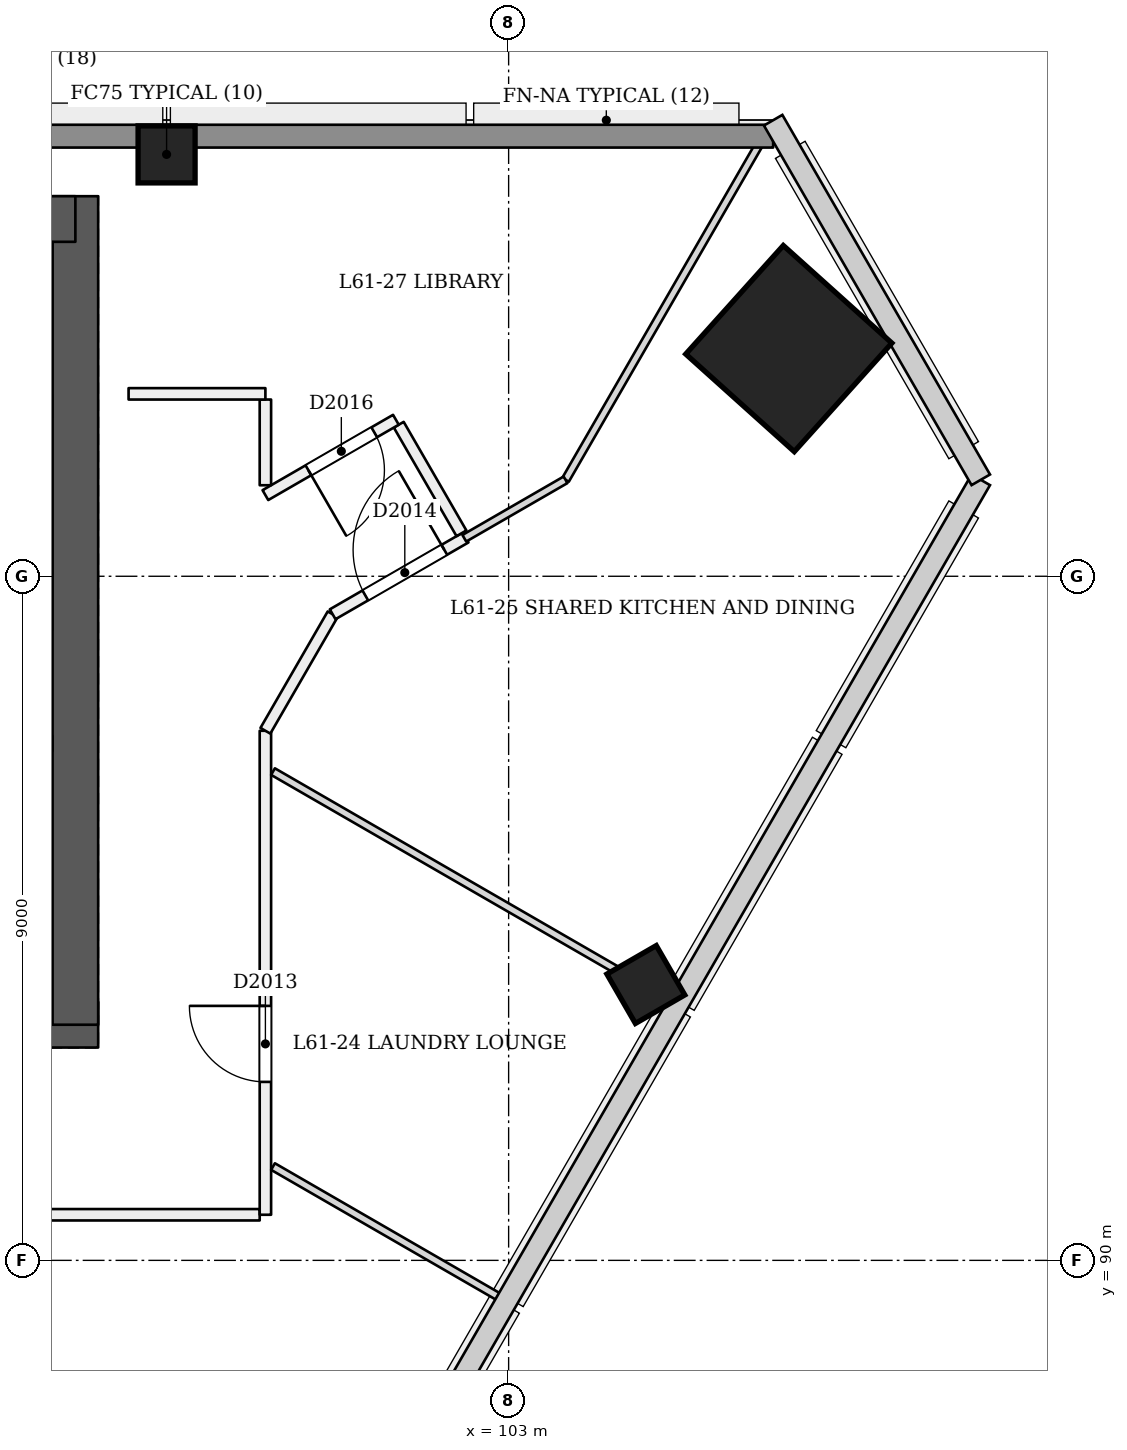
"""IFC4 building model, lengths in metres.
Left out: names, types, materials, properties, quantities, classifications, styles, units other than length and angle.
Written with IfcOpenShell. Run it as: python <this file> out.ifc"""

import sys

from ifc_helpers import new_model, si_unit, direction, frame, frame_2d, origin, origin_2d, place, context, subcontext, project, spatial, rectangle, extrude, element, fill, save


model = new_model("IFC4")
c1 = context("Model", 3, precision=1e-05, world=origin(), true_north=direction((0.0, 1.0)))
c2 = subcontext(c1, "Body", "Model", "MODEL_VIEW")
j1 = project(units=[si_unit("LENGTHUNIT", "METRE"), si_unit("PLANEANGLEUNIT", "RADIAN")], contexts=[c1])
p1 = place(None, origin())
s1 = spatial("IfcSite", under=j1, at=p1, CompositionType="ELEMENT")
p2 = place(p1, origin())
s2 = spatial("IfcBuilding", under=s1, at=p2, CompositionType="ELEMENT")
p3 = place(p2, frame((0.0, 0.0, 239.2)))
s3 = spatial("IfcBuildingStorey", under=s2, at=p3, CompositionType="ELEMENT", Elevation=239.2)
p4 = place(p3, frame((72.7, 93.1, 0.0), z_axis=(0.0, 0.0, 1.0), x_axis=(1.0, 0.0, 0.0)))
e1 = element("IfcWall", 1, at=p4, inside=s3, PredefinedType="SHEAR", context=c2, shape_type="SweptSolid", body=[
    extrude(rectangle(XDim=24.9, YDim=0.6, at=frame_2d((12.45, 0.0))), origin(), (0.0, 0.0, 1.0), 3.6),
])
p5 = place(p4, frame((1.1, 0.0, 0.0)))
e2 = element("IfcOpeningElement", 2, at=p5, cuts=e1, PredefinedType="OPENING", context=c2, shape_type="SweptSolid", body=[
    extrude(rectangle(XDim=1.2, YDim=2.1, at=frame_2d((0.6, 1.05))), frame((0.0, 0.311, 0.0), z_axis=(0.0, -1.0, 0.0), x_axis=(1.0, 0.0, 0.0)), (0.0, 0.0, 1.0), 0.621),
])
p6 = place(p4, frame((3.3, 0.0, 0.0)))
e3 = element("IfcOpeningElement", 3, at=p6, cuts=e1, PredefinedType="OPENING", context=c2, shape_type="SweptSolid", body=[
    extrude(rectangle(XDim=1.2, YDim=2.1, at=frame_2d((0.6, 1.05))), frame((0.0, 0.311, 0.0), z_axis=(0.0, -1.0, 0.0), x_axis=(1.0, 0.0, 0.0)), (0.0, 0.0, 1.0), 0.621),
])
p7 = place(p4, frame((13.3, 0.0, 0.0)))
e4 = element("IfcOpeningElement", 4, at=p7, cuts=e1, PredefinedType="OPENING", context=c2, shape_type="SweptSolid", body=[
    extrude(rectangle(XDim=1.2, YDim=2.1, at=frame_2d((0.6, 1.05))), frame((0.0, 0.311, 0.0), z_axis=(0.0, -1.0, 0.0), x_axis=(1.0, 0.0, 0.0)), (0.0, 0.0, 1.0), 0.621),
])
p8 = place(p4, frame((15.562, 0.0, 0.0)))
e5 = element("IfcOpeningElement", 5, at=p8, cuts=e1, PredefinedType="OPENING", context=c2, shape_type="SweptSolid", body=[
    extrude(rectangle(XDim=1.0, YDim=2.1, at=frame_2d((0.5, 1.05))), frame((0.0, 0.311, 0.0), z_axis=(0.0, -1.0, 0.0), x_axis=(1.0, 0.0, 0.0)), (0.0, 0.0, 1.0), 0.621),
])
p9 = place(p4, frame((18.2, 0.0, 0.0)))
e6 = element("IfcOpeningElement", 6, at=p9, cuts=e1, PredefinedType="OPENING", context=c2, shape_type="SweptSolid", body=[
    extrude(rectangle(XDim=1.0, YDim=2.1, at=frame_2d((0.5, 1.05))), frame((0.0, 0.311, 0.0), z_axis=(0.0, -1.0, 0.0), x_axis=(1.0, 0.0, 0.0)), (0.0, 0.0, 1.0), 0.621),
])
p10 = place(p4, frame((21.788, 0.0, 0.0)))
e7 = element("IfcOpeningElement", 7, at=p10, cuts=e1, PredefinedType="OPENING", context=c2, shape_type="SweptSolid", body=[
    extrude(rectangle(XDim=1.0, YDim=2.1, at=frame_2d((0.5, 1.05))), frame((0.0, 0.311, 0.0), z_axis=(0.0, -1.0, 0.0), x_axis=(1.0, 0.0, 0.0)), (0.0, 0.0, 1.0), 0.621),
])
p11 = place(p3, frame((97.3, 93.1, 0.0), z_axis=(0.0, 0.0, 1.0), x_axis=(0.0, 1.0, 0.0)))
e8 = element("IfcWall", 8, at=p11, inside=s3, PredefinedType="SHEAR", context=c2, shape_type="SweptSolid", body=[
    extrude(rectangle(XDim=10.9, YDim=0.6, at=frame_2d((5.45, 0.0))), origin(), (0.0, 0.0, 1.0), 3.6),
])
p12 = place(p3, frame((97.3, 103.7, 0.0), z_axis=(0.0, 0.0, 1.0), x_axis=(-1.0, 0.0, 0.0)))
e9 = element("IfcWall", 9, at=p12, inside=s3, PredefinedType="SHEAR", context=c2, shape_type="SweptSolid", body=[
    extrude(rectangle(XDim=24.9, YDim=0.6, at=frame_2d((12.45, 0.0))), origin(), (0.0, 0.0, 1.0), 3.6),
])
p13 = place(p3, frame((106.72, 101.984, 0.0), z_axis=(-0.028334066552, 0.009286524205, 0.999555371723), x_axis=(0.498285552857, -0.866729299586, 0.022177219255)))
e10 = element("IfcColumn", 10, at=p13, inside=s3, PredefinedType="COLUMN", context=c2, shape_type="SweptSolid", body=[
    extrude(rectangle(XDim=1.92, YDim=1.92, at=origin_2d()), origin(), (0.0, 0.0, 1.0), 3.602),
])
p14 = place(p3, frame((98.5, 104.55, 0.0), z_axis=(0.0, 0.0, 1.0), x_axis=(1.0, 0.0, 0.0)))
e11 = element("IfcColumn", 11, at=p14, inside=s3, PredefinedType="COLUMN", context=c2, shape_type="SweptSolid", body=[
    extrude(rectangle(XDim=0.75, YDim=0.75, at=origin_2d()), origin(), (0.0, 0.0, 1.0), 3.6),
])
p15 = place(p3, frame((104.832, 93.582, -0.023), z_axis=(-0.02215369191, 0.038413282303, 0.999016333038), x_axis=(-0.500654723088, -0.865363077154, 0.022171895449)))
e12 = element("IfcColumn", 12, at=p15, inside=s3, PredefinedType="COLUMN", context=c2, shape_type="SweptSolid", body=[
    extrude(rectangle(XDim=0.75, YDim=0.75, at=origin_2d()), origin(), (0.0, 0.0, 1.0), 3.604),
])
p16 = place(p3, frame((96.124, 90.6, 0.0), z_axis=(0.0, 0.0, 1.0), x_axis=(1.0, 0.0, 0.0)))
e13 = element("IfcWall", 13, at=p16, inside=s3, PredefinedType="PARTITIONING", context=c2, shape_type="SweptSolid", body=[
    extrude(rectangle(XDim=3.601, YDim=0.15, at=frame_2d((1.801, 0.0))), origin(), (0.0, 0.0, 1.0), 3.2),
])
p17 = place(p3, frame((99.8, 90.6, 0.0), z_axis=(0.0, 0.0, 1.0), x_axis=(0.0, 1.0, 0.0)))
e14 = element("IfcWall", 14, at=p17, inside=s3, PredefinedType="PARTITIONING", context=c2, shape_type="SweptSolid", body=[
    extrude(rectangle(XDim=6.367, YDim=0.15, at=frame_2d((3.184, 0.0))), origin(), (0.0, 0.0, 1.0), 3.2),
])
p18 = place(p17, frame((1.748, 0.0, 0.0)))
e15 = element("IfcOpeningElement", 15, at=p18, cuts=e14, PredefinedType="OPENING", context=c2, shape_type="SweptSolid", body=[
    extrude(rectangle(XDim=1.0, YDim=2.1, at=frame_2d((0.5, 1.05))), frame((0.0, 0.085, 0.0), z_axis=(0.0, -1.0, 0.0), x_axis=(1.0, 0.0, 0.0)), (0.0, 0.0, 1.0), 0.171),
])
p19 = place(p3, frame((99.8, 96.967, 0.0), z_axis=(0.0, 0.0, 1.0), x_axis=(0.499937404092, 0.866061540533, 0.0)))
e16 = element("IfcWall", 16, at=p19, inside=s3, PredefinedType="PARTITIONING", context=c2, shape_type="SweptSolid", body=[
    extrude(rectangle(XDim=1.77, YDim=0.15, at=frame_2d((0.885, 0.0))), origin(), (0.0, 0.0, 1.0), 3.2),
])
p20 = place(p3, frame((100.685, 98.5, 0.0), z_axis=(0.0, 0.0, 1.0), x_axis=(0.866040685659, 0.499973530083, 0.0)))
e17 = element("IfcWall", 17, at=p20, inside=s3, PredefinedType="PARTITIONING", context=c2, shape_type="SweptSolid", body=[
    extrude(rectangle(XDim=2.02, YDim=0.15, at=frame_2d((1.01, 0.0))), origin(), (0.0, 0.0, 1.0), 3.2),
])
p21 = place(p20, frame((0.496, 0.0, 0.0)))
e18 = element("IfcOpeningElement", 18, at=p21, cuts=e17, PredefinedType="OPENING", context=c2, shape_type="SweptSolid", body=[
    extrude(rectangle(XDim=1.2, YDim=2.1, at=frame_2d((0.6, 1.05))), frame((0.0, 0.085, 0.0), z_axis=(0.0, -1.0, 0.0), x_axis=(1.0, 0.0, 0.0)), (0.0, 0.0, 1.0), 0.171),
])
p22 = place(p3, frame((102.379, 99.565, 0.0), z_axis=(0.0, 0.0, 1.0), x_axis=(-0.499974350878, 0.866040211805, 0.0)))
e19 = element("IfcWall", 19, at=p22, inside=s3, PredefinedType="PARTITIONING", context=c2, shape_type="SweptSolid", body=[
    extrude(rectangle(XDim=1.65, YDim=0.15, at=frame_2d((0.825, 0.0))), origin(), (0.0, 0.0, 1.0), 3.2),
])
p23 = place(p3, frame((101.517, 101.059, 0.0), z_axis=(0.0, 0.0, 1.0), x_axis=(-0.866021515814, -0.500006734102, 0.0)))
e20 = element("IfcWall", 20, at=p23, inside=s3, PredefinedType="PARTITIONING", context=c2, shape_type="SweptSolid", body=[
    extrude(rectangle(XDim=1.982, YDim=0.15, at=frame_2d((0.991, 0.0))), origin(), (0.0, 0.0, 1.0), 3.2),
])
p24 = place(p23, frame((0.329, 0.0, 0.0)))
e21 = element("IfcOpeningElement", 21, at=p24, cuts=e20, PredefinedType="OPENING", context=c2, shape_type="SweptSolid", body=[
    extrude(rectangle(XDim=1.0, YDim=2.1, at=frame_2d((0.5, 1.05))), frame((0.0, 0.085, 0.0), z_axis=(0.0, -1.0, 0.0), x_axis=(1.0, 0.0, 0.0)), (0.0, 0.0, 1.0), 0.171),
])
p25 = place(p3, frame((99.8, 100.198, 0.0), z_axis=(0.0, 0.0, 1.0), x_axis=(0.0, 1.0, 0.0)))
e22 = element("IfcWall", 22, at=p25, inside=s3, PredefinedType="PARTITIONING", context=c2, shape_type="SweptSolid", body=[
    extrude(rectangle(XDim=1.127, YDim=0.15, at=frame_2d((0.564, 0.0))), origin(), (0.0, 0.0, 1.0), 3.2),
])
p26 = place(p3, frame((99.8, 101.4, 0.0), z_axis=(0.0, 0.0, 1.0), x_axis=(-1.0, 0.0, 0.0)))
e23 = element("IfcWall", 23, at=p26, inside=s3, PredefinedType="PARTITIONING", context=c2, shape_type="SweptSolid", body=[
    extrude(rectangle(XDim=1.8, YDim=0.15, at=frame_2d((0.9, 0.0))), origin(), (0.0, 0.0, 1.0), 3.2),
])
p27 = place(p3, frame((102.903, 89.501, 0.0), z_axis=(0.0, 0.0, 1.0), x_axis=(-0.866050739643, 0.499956114438, 0.0)))
e24 = element("IfcWall", 24, at=p27, inside=s3, PredefinedType="PARTITIONING", context=c2, shape_type="SweptSolid", body=[
    extrude(rectangle(XDim=3.467, YDim=0.1, at=frame_2d((1.733, 0.0))), origin(), (0.0, 0.0, 1.0), 2.7),
])
p28 = place(p3, frame((105.135, 93.408, 0.0), z_axis=(0.0, 0.0, 1.0), x_axis=(-0.866045022241, 0.499966018296, 0.0)))
e25 = element("IfcWall", 25, at=p28, inside=s3, PredefinedType="PARTITIONING", context=c2, shape_type="SweptSolid", body=[
    extrude(rectangle(XDim=6.045, YDim=0.1, at=frame_2d((3.022, 0.0))), origin(), (0.0, 0.0, 1.0), 2.7),
])
p29 = place(p3, frame((106.422, 104.9, 0.0), z_axis=(0.0, 0.0, 1.0), x_axis=(-0.500008311739, -0.866020604947, 0.0)))
e26 = element("IfcWall", 26, at=p29, inside=s3, PredefinedType="PARTITIONING", context=c2, shape_type="SweptSolid", body=[
    extrude(rectangle(XDim=5.348, YDim=0.1, at=frame_2d((2.674, 0.0))), origin(), (0.0, 0.0, 1.0), 2.7),
])
p30 = place(p3, frame((103.749, 100.269, 0.0), z_axis=(0.0, 0.0, 1.0), x_axis=(-0.866016353143, -0.500015675843, 0.0)))
e27 = element("IfcWall", 27, at=p30, inside=s3, PredefinedType="PARTITIONING", context=c2, shape_type="SweptSolid", body=[
    extrude(rectangle(XDim=1.538, YDim=0.1, at=frame_2d((0.769, 0.0))), origin(), (0.0, 0.0, 1.0), 3.2),
])
p31 = place(p3, frame((63.52, 104.79, 0.0), z_axis=(0.0, 0.0, 1.0), x_axis=(1.0, 0.0, 0.0)))
e28 = element("IfcWall", 28, at=p31, inside=s3, PredefinedType="SOLIDWALL", context=c2, shape_type="SweptSolid", body=[
    extrude(rectangle(XDim=42.96, YDim=0.3, at=frame_2d((21.48, 0.0))), origin(), (0.0, 0.0, 1.0), 2.7),
])
p32 = place(p18, origin())
e29 = element("IfcDoor", 29, at=p32, inside=s3, OperationType="SINGLE_SWING_RIGHT", PredefinedType="NOTDEFINED", context=c2, shape_type="SweptSolid", body=[
    extrude(rectangle(XDim=1.0, YDim=2.1, at=frame_2d((0.5, 1.05))), frame((0.0, 0.025, 0.0), z_axis=(0.0, -1.0, 0.0), x_axis=(1.0, 0.0, 0.0)), (0.0, 0.0, 1.0), 0.05),
])
fill(e15, e29)
p33 = place(p21, origin())
e30 = element("IfcDoor", 30, at=p33, inside=s3, OperationType="SINGLE_SWING_RIGHT", PredefinedType="NOTDEFINED", context=c2, shape_type="SweptSolid", body=[
    extrude(rectangle(XDim=1.2, YDim=2.1, at=frame_2d((0.6, 1.05))), frame((0.0, 0.025, 0.0), z_axis=(0.0, -1.0, 0.0), x_axis=(1.0, 0.0, 0.0)), (0.0, 0.0, 1.0), 0.05),
])
fill(e18, e30)
p34 = place(p24, origin())
e31 = element("IfcDoor", 31, at=p34, inside=s3, OperationType="SINGLE_SWING_RIGHT", PredefinedType="NOTDEFINED", context=c2, shape_type="SweptSolid", body=[
    extrude(rectangle(XDim=1.0, YDim=2.1, at=frame_2d((0.5, 1.05))), frame((0.0, 0.025, 0.0), z_axis=(0.0, -1.0, 0.0), x_axis=(1.0, 0.0, 0.0)), (0.0, 0.0, 1.0), 0.05),
])
fill(e21, e31)
save(model, sys.argv[1])
